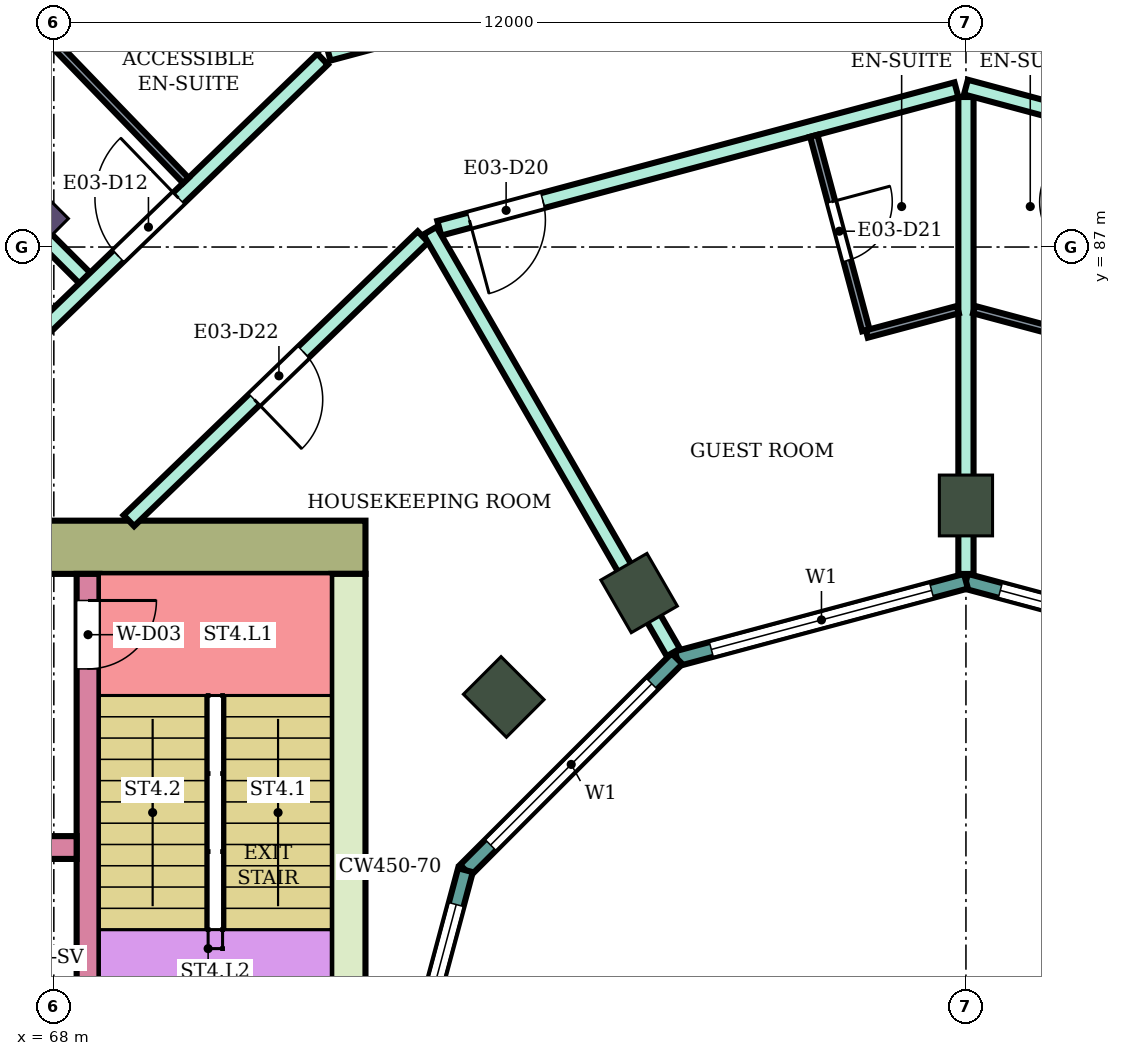
"""IFC4 building model, lengths in metres.
Left out: names, types, materials, properties, quantities, classifications, styles, units other than length and angle.
Written with IfcOpenShell. Run it as: python <this file> out.ifc"""

import sys

from ifc_helpers import new_model, si_unit, direction, frame, frame_2d, origin, origin_2d, place, context, subcontext, project, spatial, rectangle, extrude, element, fill, save


model = new_model("IFC4")
c1 = context("Model", 3, precision=1e-05, world=origin(), true_north=direction((0.0, 1.0)))
c2 = subcontext(c1, "Body", "Model", "MODEL_VIEW")
j1 = project(units=[si_unit("LENGTHUNIT", "METRE"), si_unit("PLANEANGLEUNIT", "RADIAN")], contexts=[c1])
p1 = place(None, origin())
s1 = spatial("IfcSite", under=j1, at=p1, CompositionType="ELEMENT")
p2 = place(p1, origin())
s2 = spatial("IfcBuilding", under=s1, at=p2, CompositionType="ELEMENT")
p3 = place(p2, frame((0.0, 0.0, 141.9)))
s3 = spatial("IfcBuildingStorey", under=s2, at=p3, CompositionType="ELEMENT", Elevation=141.9)
p4 = place(p3, frame((67.555, 87.445, 0.0), z_axis=(0.0, 0.0, 1.0), x_axis=(-0.707106781187, 0.707106781187, 0.0)))
e1 = element("IfcColumn", 1, at=p4, inside=s3, PredefinedType="COLUMN", context=c2, shape_type="SweptSolid", body=[
    extrude(rectangle(XDim=1.0, YDim=0.8, at=origin_2d()), origin(), (0.0, 0.0, 1.0), 3.9),
])
for number, where, z_axis, x_axis in (
    (2, (80.0, 83.6, 0.0), (0.0, 0.0, 1.0), (0.0, 1.0, 0.0)),
    (3, (75.7, 82.448, 0.0), (0.0, 0.0, 1.0), (-0.5, 0.866, 0.0)),
    (4, (73.919, 81.081, 0.0), (0.0, 0.0, 1.0), (-0.707, 0.707, 0.0)),
):
    element("IfcColumn", number, at=place(p3, frame(where, z_axis=z_axis, x_axis=x_axis)), inside=s3, PredefinedType="COLUMN", context=c2, shape_type="SweptSolid", body=[
        extrude(rectangle(XDim=0.8, YDim=0.7, at=origin_2d()), origin(), (0.0, 0.0, 1.0), 3.9),
    ])
p5 = place(p3, frame((72.1, 83.05, 0.0), z_axis=(0.0, 0.0, 1.0), x_axis=(-1.0, 0.0, 0.0)))
e5 = element("IfcWall", 5, at=p5, inside=s3, PredefinedType="SHEAR", context=c2, shape_type="SweptSolid", body=[
    extrude(rectangle(XDim=14.8, YDim=0.7, at=frame_2d((7.4, 0.0))), origin(), (0.0, 0.0, 1.0), 3.58),
])
p6 = place(p5, frame((4.2, 0.0, 0.0)))
e6 = element("IfcOpeningElement", 6, at=p6, cuts=e5, PredefinedType="OPENING", context=c2, shape_type="SweptSolid", body=[
    extrude(rectangle(XDim=2.4, YDim=2.4, at=frame_2d((1.2, 1.2))), frame((0.0, 0.36, 0.0), z_axis=(0.0, -1.0, 0.0), x_axis=(1.0, 0.0, 0.0)), (0.0, 0.0, 1.0), 0.72),
])
p7 = place(p3, frame((71.875, 82.7, 0.0), z_axis=(0.0, 0.0, 1.0), x_axis=(0.0, -1.0, 0.0)))
e7 = element("IfcWall", 7, at=p7, inside=s3, PredefinedType="SHEAR", context=c2, shape_type="SweptSolid", body=[
    extrude(rectangle(XDim=7.7, YDim=0.45, at=frame_2d((3.85, 0.0))), origin(), (0.0, 0.0, 1.0), 3.58),
])
p8 = place(p3, frame((68.45, 82.7, 0.0), z_axis=(0.0, 0.0, 1.0), x_axis=(0.0, -1.0, 0.0)))
e8 = element("IfcWall", 8, at=p8, inside=s3, PredefinedType="SHEAR", context=c2, shape_type="SweptSolid", body=[
    extrude(rectangle(XDim=7.7, YDim=0.3, at=frame_2d((3.85, 0.0))), origin(), (0.0, 0.0, 1.0), 3.58),
])
p9 = place(p8, frame((0.35, 0.0, 0.0)))
e9 = element("IfcOpeningElement", 9, at=p9, cuts=e8, PredefinedType="OPENING", context=c2, shape_type="SweptSolid", body=[
    extrude(rectangle(XDim=0.9, YDim=2.1, at=frame_2d((0.45, 1.05))), frame((0.0, 0.16, 0.0), z_axis=(0.0, -1.0, 0.0), x_axis=(1.0, 0.0, 0.0)), (0.0, 0.0, 1.0), 0.32),
])
p10 = place(p3, frame((68.3, 79.1, 0.0), z_axis=(0.0, 0.0, 1.0), x_axis=(-1.0, 0.0, 0.0)))
e10 = element("IfcWall", 10, at=p10, inside=s3, PredefinedType="SHEAR", context=c2, shape_type="SweptSolid", body=[
    extrude(rectangle(XDim=11.0, YDim=0.3, at=frame_2d((5.5, 0.0))), origin(), (0.0, 0.0, 1.0), 3.58),
])
p11 = place(p10, frame((0.4, 0.0, 0.0)))
e11 = element("IfcOpeningElement", 11, at=p11, cuts=e10, PredefinedType="OPENING", context=c2, shape_type="SweptSolid", body=[
    extrude(rectangle(XDim=1.4, YDim=2.1, at=frame_2d((0.7, 1.05))), frame((0.0, 0.16, 0.0), z_axis=(0.0, -1.0, 0.0), x_axis=(1.0, 0.0, 0.0)), (0.0, 0.0, 1.0), 0.32),
])
p12 = place(p10, frame((5.4, 0.0, 0.0)))
e12 = element("IfcOpeningElement", 12, at=p12, cuts=e10, PredefinedType="OPENING", context=c2, shape_type="SweptSolid", body=[
    extrude(rectangle(XDim=1.4, YDim=2.1, at=frame_2d((0.7, 1.05))), frame((0.0, 0.16, 0.0), z_axis=(0.0, -1.0, 0.0), x_axis=(1.0, 0.0, 0.0)), (0.0, 0.0, 1.0), 0.32),
])
p13 = place(p10, frame((8.1, 0.0, 0.0)))
e13 = element("IfcOpeningElement", 13, at=p13, cuts=e10, PredefinedType="OPENING", context=c2, shape_type="SweptSolid", body=[
    extrude(rectangle(XDim=1.0, YDim=2.1, at=frame_2d((0.5, 1.05))), frame((0.0, 0.16, 0.0), z_axis=(0.0, -1.0, 0.0), x_axis=(1.0, 0.0, 0.0)), (0.0, 0.0, 1.0), 0.32),
])
p14 = place(p3, frame((83.802, 81.585, 0.0), z_axis=(0.0, 0.0, 1.0), x_axis=(-0.965933654434, 0.258789828301, 0.0)))
e14 = element("IfcWall", 14, at=p14, inside=s3, PredefinedType="NOTDEFINED", context=c2, shape_type="SweptSolid", body=[
    extrude(rectangle(XDim=3.936, YDim=0.2, at=frame_2d((1.968, 0.0))), origin(), (0.0, 0.0, 1.0), 3.9),
])
p15 = place(p14, frame((0.468, 0.0, 0.9)))
e15 = element("IfcOpeningElement", 15, at=p15, cuts=e14, PredefinedType="OPENING", context=c2, shape_type="SweptSolid", body=[
    extrude(rectangle(XDim=3.0, YDim=2.3, at=frame_2d((1.5, 1.15))), frame((0.0, 0.11, 0.0), z_axis=(0.0, -1.0, 0.0), x_axis=(1.0, 0.0, 0.0)), (0.0, 0.0, 1.0), 0.22),
])
p16 = place(p3, frame((80.0, 82.604, 0.0), z_axis=(0.0, 0.0, 1.0), x_axis=(-0.965933654434, -0.258789828301, 0.0)))
e16 = element("IfcWall", 16, at=p16, inside=s3, PredefinedType="NOTDEFINED", context=c2, shape_type="SweptSolid", body=[
    extrude(rectangle(XDim=3.936, YDim=0.2, at=frame_2d((1.968, 0.0))), origin(), (0.0, 0.0, 1.0), 3.9),
])
p17 = place(p16, frame((0.468, 0.0, 0.9)))
e17 = element("IfcOpeningElement", 17, at=p17, cuts=e16, PredefinedType="OPENING", context=c2, shape_type="SweptSolid", body=[
    extrude(rectangle(XDim=3.0, YDim=2.3, at=frame_2d((1.5, 1.15))), frame((0.0, 0.11, 0.0), z_axis=(0.0, -1.0, 0.0), x_axis=(1.0, 0.0, 0.0)), (0.0, 0.0, 1.0), 0.22),
])
p18 = place(p3, frame((76.198, 81.585, 0.0), z_axis=(0.0, 0.0, 1.0), x_axis=(-0.707106781187, -0.707106781187, 0.0)))
e18 = element("IfcWall", 18, at=p18, inside=s3, PredefinedType="NOTDEFINED", context=c2, shape_type="SweptSolid", body=[
    extrude(rectangle(XDim=3.936, YDim=0.2, at=frame_2d((1.968, 0.0))), origin(), (0.0, 0.0, 1.0), 3.9),
])
p19 = place(p18, frame((0.468, 0.0, 0.9)))
e19 = element("IfcOpeningElement", 19, at=p19, cuts=e18, PredefinedType="OPENING", context=c2, shape_type="SweptSolid", body=[
    extrude(rectangle(XDim=3.0, YDim=2.3, at=frame_2d((1.5, 1.15))), frame((0.0, 0.11, 0.0), z_axis=(0.0, -1.0, 0.0), x_axis=(1.0, 0.0, 0.0)), (0.0, 0.0, 1.0), 0.22),
])
p20 = place(p3, frame((73.415, 78.802, 0.0), z_axis=(0.0, 0.0, 1.0), x_axis=(-0.258789828301, -0.965933654434, 0.0)))
e20 = element("IfcWall", 20, at=p20, inside=s3, PredefinedType="NOTDEFINED", context=c2, shape_type="SweptSolid", body=[
    extrude(rectangle(XDim=3.936, YDim=0.2, at=frame_2d((1.968, 0.0))), origin(), (0.0, 0.0, 1.0), 3.9),
])
p21 = place(p20, frame((0.468, 0.0, 0.9)))
e21 = element("IfcOpeningElement", 21, at=p21, cuts=e20, PredefinedType="OPENING", context=c2, shape_type="SweptSolid", body=[
    extrude(rectangle(XDim=3.0, YDim=2.3, at=frame_2d((1.5, 1.15))), frame((0.0, 0.11, 0.0), z_axis=(0.0, -1.0, 0.0), x_axis=(1.0, 0.0, 0.0)), (0.0, 0.0, 1.0), 0.22),
])
p22 = place(p3, frame((63.596, 91.406, 0.0), z_axis=(0.0, 0.0, 1.0), x_axis=(0.706963264491, -0.707250268759, 0.0)))
e22 = element("IfcWall", 22, at=p22, inside=s3, PredefinedType="PARTITIONING", context=c2, shape_type="SweptSolid", body=[
    extrude(rectangle(XDim=6.805, YDim=0.2, at=frame_2d((3.403, 0.0))), origin(), (0.0, 0.0, 1.0), 3.45),
])
p23 = place(p3, frame((66.797, 84.9, 0.0), z_axis=(0.0, 0.0, 1.0), x_axis=(0.719692092412, 0.694293376116, 0.0)))
e23 = element("IfcWall", 23, at=p23, inside=s3, PredefinedType="PARTITIONING", context=c2, shape_type="SweptSolid", body=[
    extrude(rectangle(XDim=6.584, YDim=0.2, at=frame_2d((3.292, 0.0))), origin(), (0.0, 0.0, 1.0), 3.45),
])
p24 = place(p23, frame((2.852, 0.0, 0.0)))
e24 = element("IfcOpeningElement", 24, at=p24, cuts=e23, PredefinedType="OPENING", context=c2, shape_type="SweptSolid", body=[
    extrude(rectangle(XDim=1.1, YDim=2.1, at=frame_2d((0.55, 1.05))), frame((0.0, 0.11, 0.0), z_axis=(0.0, -1.0, 0.0), x_axis=(1.0, 0.0, 0.0)), (0.0, 0.0, 1.0), 0.22),
])
p25 = place(p3, frame((68.987, 83.4, 0.0), z_axis=(0.0, 0.0, 1.0), x_axis=(0.719547721855, 0.694442996922, 0.0)))
e25 = element("IfcWall", 25, at=p25, inside=s3, PredefinedType="PARTITIONING", context=c2, shape_type="SweptSolid", body=[
    extrude(rectangle(XDim=5.378, YDim=0.2, at=frame_2d((2.689, 0.0))), origin(), (0.0, 0.0, 1.0), 3.45),
])
p26 = place(p25, frame((2.294, 0.0, 0.0)))
e26 = element("IfcOpeningElement", 26, at=p26, cuts=e25, PredefinedType="OPENING", context=c2, shape_type="SweptSolid", body=[
    extrude(rectangle(XDim=0.9, YDim=2.1, at=frame_2d((0.45, 1.05))), frame((0.0, 0.11, 0.0), z_axis=(0.0, -1.0, 0.0), x_axis=(1.0, 0.0, 0.0)), (0.0, 0.0, 1.0), 0.22),
])
p27 = place(p3, frame((71.614, 89.55, 0.0), z_axis=(0.0, 0.0, 1.0), x_axis=(0.965982156828, 0.258608725086, 0.0)))
e27 = element("IfcWall", 27, at=p27, inside=s3, PredefinedType="PARTITIONING", context=c2, shape_type="SweptSolid", body=[
    extrude(rectangle(XDim=8.592, YDim=0.2, at=frame_2d((4.296, 0.0))), origin(), (0.0, 0.0, 1.0), 3.45),
])
p28 = place(p27, frame((4.865, 0.0, 0.0)))
e28 = element("IfcOpeningElement", 28, at=p28, cuts=e27, PredefinedType="OPENING", context=c2, shape_type="SweptSolid", body=[
    extrude(rectangle(XDim=1.0, YDim=2.1, at=frame_2d((0.5, 1.05))), frame((0.0, 0.11, 0.0), z_axis=(0.0, -1.0, 0.0), x_axis=(1.0, 0.0, 0.0)), (0.0, 0.0, 1.0), 0.22),
])
p29 = place(p27, frame((2.804, 0.0, 0.0)))
e29 = element("IfcOpeningElement", 29, at=p29, cuts=e27, PredefinedType="OPENING", context=c2, shape_type="SweptSolid", body=[
    extrude(rectangle(XDim=1.0, YDim=2.1, at=frame_2d((0.5, 1.05))), frame((0.0, 0.11, 0.0), z_axis=(0.0, -1.0, 0.0), x_axis=(1.0, 0.0, 0.0)), (0.0, 0.0, 1.0), 0.22),
])
p30 = place(p3, frame((73.071, 87.247, 0.0), z_axis=(0.0, 0.0, 1.0), x_axis=(0.965931651205, 0.258797305243, 0.0)))
e30 = element("IfcWall", 30, at=p30, inside=s3, PredefinedType="PARTITIONING", context=c2, shape_type="SweptSolid", body=[
    extrude(rectangle(XDim=7.043, YDim=0.2, at=frame_2d((3.521, 0.0))), origin(), (0.0, 0.0, 1.0), 3.45),
])
p31 = place(p30, frame((0.41, 0.0, 0.0)))
e31 = element("IfcOpeningElement", 31, at=p31, cuts=e30, PredefinedType="OPENING", context=c2, shape_type="SweptSolid", body=[
    extrude(rectangle(XDim=1.0, YDim=2.1, at=frame_2d((0.5, 1.05))), frame((0.0, 0.11, 0.0), z_axis=(0.0, -1.0, 0.0), x_axis=(1.0, 0.0, 0.0)), (0.0, 0.0, 1.0), 0.22),
])
p32 = place(p3, frame((72.948, 87.214, 0.0), z_axis=(0.0, 0.0, 1.0), x_axis=(0.499898430755, -0.866084036875, 0.0)))
e32 = element("IfcWall", 32, at=p32, inside=s3, PredefinedType="PARTITIONING", context=c2, shape_type="SweptSolid", body=[
    extrude(rectangle(XDim=6.405, YDim=0.2, at=frame_2d((3.203, 0.0))), origin(), (0.0, 0.0, 1.0), 3.45),
])
p33 = place(p3, frame((80.0, 82.699, 0.0), z_axis=(0.0, 0.0, 1.0), x_axis=(0.0, 1.0, 0.0)))
e33 = element("IfcWall", 33, at=p33, inside=s3, PredefinedType="PARTITIONING", context=c2, shape_type="SweptSolid", body=[
    extrude(rectangle(XDim=6.275, YDim=0.2, at=frame_2d((3.138, 0.0))), origin(), (0.0, 0.0, 1.0), 3.45),
])
p34 = place(p3, frame((80.0, 89.104, 0.0), z_axis=(0.0, 0.0, 1.0), x_axis=(0.965854247166, -0.25908603442, 0.0)))
e34 = element("IfcWall", 34, at=p34, inside=s3, PredefinedType="PARTITIONING", context=c2, shape_type="SweptSolid", body=[
    extrude(rectangle(XDim=7.183, YDim=0.2, at=frame_2d((3.592, 0.0))), origin(), (0.0, 0.0, 1.0), 3.45),
])
p35 = place(p34, frame((5.763, 0.0, 0.0)))
e35 = element("IfcOpeningElement", 35, at=p35, cuts=e34, PredefinedType="OPENING", context=c2, shape_type="SweptSolid", body=[
    extrude(rectangle(XDim=1.0, YDim=2.1, at=frame_2d((0.5, 1.05))), frame((0.0, 0.11, 0.0), z_axis=(0.0, -1.0, 0.0), x_axis=(1.0, 0.0, 0.0)), (0.0, 0.0, 1.0), 0.22),
])
p36 = place(p3, frame((80.0, 91.796, 0.0), z_axis=(0.0, 0.0, 1.0), x_axis=(0.965891796243, -0.258946013582, 0.0)))
e36 = element("IfcWall", 36, at=p36, inside=s3, PredefinedType="PARTITIONING", context=c2, shape_type="SweptSolid", body=[
    extrude(rectangle(XDim=8.642, YDim=0.2, at=frame_2d((4.321, 0.0))), origin(), (0.0, 0.0, 1.0), 3.45),
])
p37 = place(p36, frame((4.877, 0.0, 0.0)))
e37 = element("IfcOpeningElement", 37, at=p37, cuts=e36, PredefinedType="OPENING", context=c2, shape_type="SweptSolid", body=[
    extrude(rectangle(XDim=1.0, YDim=2.1, at=frame_2d((0.5, 1.05))), frame((0.0, 0.11, 0.0), z_axis=(0.0, -1.0, 0.0), x_axis=(1.0, 0.0, 0.0)), (0.0, 0.0, 1.0), 0.22),
])
p38 = place(p36, frame((2.817, 0.0, 0.0)))
e38 = element("IfcOpeningElement", 38, at=p38, cuts=e36, PredefinedType="OPENING", context=c2, shape_type="SweptSolid", body=[
    extrude(rectangle(XDim=1.0, YDim=2.1, at=frame_2d((0.5, 1.05))), frame((0.0, 0.11, 0.0), z_axis=(0.0, -1.0, 0.0), x_axis=(1.0, 0.0, 0.0)), (0.0, 0.0, 1.0), 0.22),
])
p39 = place(p3, frame((67.758, 89.926, 0.0), z_axis=(0.0, 0.0, 1.0), x_axis=(0.694485934895, -0.719506279495, 0.0)))
e39 = element("IfcWall", 39, at=p39, inside=s3, PredefinedType="PARTITIONING", context=c2, shape_type="SweptSolid", body=[
    extrude(rectangle(XDim=2.849, YDim=0.1, at=frame_2d((1.425, 0.0))), origin(), (0.0, 0.0, 1.0), 3.45),
])
p40 = place(p3, frame((77.998, 88.463, 0.0), z_axis=(0.0, 0.0, 1.0), x_axis=(0.258677737588, -0.965963678446, 0.0)))
e40 = element("IfcWall", 40, at=p40, inside=s3, PredefinedType="PARTITIONING", context=c2, shape_type="SweptSolid", body=[
    extrude(rectangle(XDim=2.649, YDim=0.1, at=frame_2d((1.325, 0.0))), origin(), (0.0, 0.0, 1.0), 3.45),
])
p41 = place(p40, frame((0.9, 0.0, 0.0)))
e41 = element("IfcOpeningElement", 41, at=p41, cuts=e40, PredefinedType="OPENING", context=c2, shape_type="SweptSolid", body=[
    extrude(rectangle(XDim=0.8, YDim=2.1, at=frame_2d((0.4, 1.05))), frame((0.0, 0.06, 0.0), z_axis=(0.0, -1.0, 0.0), x_axis=(1.0, 0.0, 0.0)), (0.0, 0.0, 1.0), 0.12),
])
p42 = place(p3, frame((78.696, 85.856, 0.0), z_axis=(0.0, 0.0, 1.0), x_axis=(0.966002513606, 0.258532674351, 0.0)))
e42 = element("IfcWall", 42, at=p42, inside=s3, PredefinedType="PARTITIONING", context=c2, shape_type="SweptSolid", body=[
    extrude(rectangle(XDim=1.24, YDim=0.1, at=frame_2d((0.62, 0.0))), origin(), (0.0, 0.0, 1.0), 3.45),
])
p43 = place(p3, frame((80.106, 86.177, 0.0), z_axis=(0.0, 0.0, 1.0), x_axis=(0.966002973184, -0.258530957139, 0.0)))
e43 = element("IfcWall", 43, at=p43, inside=s3, PredefinedType="PARTITIONING", context=c2, shape_type="SweptSolid", body=[
    extrude(rectangle(XDim=1.19, YDim=0.1, at=frame_2d((0.595, 0.0))), origin(), (0.0, 0.0, 1.0), 3.45),
])
p44 = place(p15, origin())
e44 = element("IfcWindow", 44, at=p44, inside=s3, PartitioningType="SINGLE_PANEL", PredefinedType="WINDOW", context=c2, shape_type="SweptSolid", body=[
    extrude(rectangle(XDim=3.0, YDim=2.3, at=frame_2d((1.5, 1.15))), frame((0.0, 0.03, 0.0), z_axis=(0.0, -1.0, 0.0), x_axis=(1.0, 0.0, 0.0)), (0.0, 0.0, 1.0), 0.06),
])
fill(e15, e44)
p45 = place(p17, origin())
e45 = element("IfcWindow", 45, at=p45, inside=s3, PartitioningType="SINGLE_PANEL", PredefinedType="WINDOW", context=c2, shape_type="SweptSolid", body=[
    extrude(rectangle(XDim=3.0, YDim=2.3, at=frame_2d((1.5, 1.15))), frame((0.0, 0.03, 0.0), z_axis=(0.0, -1.0, 0.0), x_axis=(1.0, 0.0, 0.0)), (0.0, 0.0, 1.0), 0.06),
])
fill(e17, e45)
p46 = place(p19, origin())
e46 = element("IfcWindow", 46, at=p46, inside=s3, PartitioningType="SINGLE_PANEL", PredefinedType="WINDOW", context=c2, shape_type="SweptSolid", body=[
    extrude(rectangle(XDim=3.0, YDim=2.3, at=frame_2d((1.5, 1.15))), frame((0.0, 0.03, 0.0), z_axis=(0.0, -1.0, 0.0), x_axis=(1.0, 0.0, 0.0)), (0.0, 0.0, 1.0), 0.06),
])
fill(e19, e46)
p47 = place(p21, origin())
e47 = element("IfcWindow", 47, at=p47, inside=s3, PartitioningType="SINGLE_PANEL", PredefinedType="WINDOW", context=c2, shape_type="SweptSolid", body=[
    extrude(rectangle(XDim=3.0, YDim=2.3, at=frame_2d((1.5, 1.15))), frame((0.0, 0.03, 0.0), z_axis=(0.0, -1.0, 0.0), x_axis=(1.0, 0.0, 0.0)), (0.0, 0.0, 1.0), 0.06),
])
fill(e21, e47)
p48 = place(p24, origin())
e48 = element("IfcDoor", 48, at=p48, inside=s3, OperationType="SINGLE_SWING_RIGHT", PredefinedType="DOOR", context=c2, shape_type="SweptSolid", body=[
    extrude(rectangle(XDim=1.1, YDim=2.1, at=frame_2d((0.55, 1.05))), frame((0.0, 0.025, 0.0), z_axis=(0.0, -1.0, 0.0), x_axis=(1.0, 0.0, 0.0)), (0.0, 0.0, 1.0), 0.05),
])
fill(e24, e48)
p49 = place(p31, frame((1.0, 0.0, 0.0), z_axis=(0.0, 0.0, 1.0), x_axis=(-1.0, 0.0, 0.0)))
e49 = element("IfcDoor", 49, at=p49, inside=s3, OperationType="SINGLE_SWING_RIGHT", PredefinedType="DOOR", context=c2, shape_type="SweptSolid", body=[
    extrude(rectangle(XDim=1.0, YDim=2.1, at=frame_2d((0.5, 1.05))), frame((0.0, 0.025, 0.0), z_axis=(0.0, -1.0, 0.0), x_axis=(1.0, 0.0, 0.0)), (0.0, 0.0, 1.0), 0.05),
])
fill(e31, e49)
p50 = place(p41, origin())
e50 = element("IfcDoor", 50, at=p50, inside=s3, OperationType="SINGLE_SWING_LEFT", PredefinedType="DOOR", context=c2, shape_type="SweptSolid", body=[
    extrude(rectangle(XDim=0.8, YDim=2.1, at=frame_2d((0.4, 1.05))), frame((0.0, 0.025, 0.0), z_axis=(0.0, -1.0, 0.0), x_axis=(1.0, 0.0, 0.0)), (0.0, 0.0, 1.0), 0.05),
])
fill(e41, e50)
p51 = place(p26, frame((0.9, 0.0, 0.0), z_axis=(0.0, 0.0, 1.0), x_axis=(-1.0, 0.0, 0.0)))
e51 = element("IfcDoor", 51, at=p51, inside=s3, OperationType="SINGLE_SWING_RIGHT", PredefinedType="DOOR", context=c2, shape_type="SweptSolid", body=[
    extrude(rectangle(XDim=0.9, YDim=2.1, at=frame_2d((0.45, 1.05))), frame((0.0, 0.025, 0.0), z_axis=(0.0, -1.0, 0.0), x_axis=(1.0, 0.0, 0.0)), (0.0, 0.0, 1.0), 0.05),
])
fill(e26, e51)
p52 = place(p9, origin())
e52 = element("IfcDoor", 52, at=p52, inside=s3, OperationType="SINGLE_SWING_LEFT", PredefinedType="DOOR", context=c2, shape_type="SweptSolid", body=[
    extrude(rectangle(XDim=0.9, YDim=2.1, at=frame_2d((0.45, 1.05))), frame((0.0, 0.025, 0.0), z_axis=(0.0, -1.0, 0.0), x_axis=(1.0, 0.0, 0.0)), (0.0, 0.0, 1.0), 0.05),
])
fill(e9, e52)
save(model, sys.argv[1])
